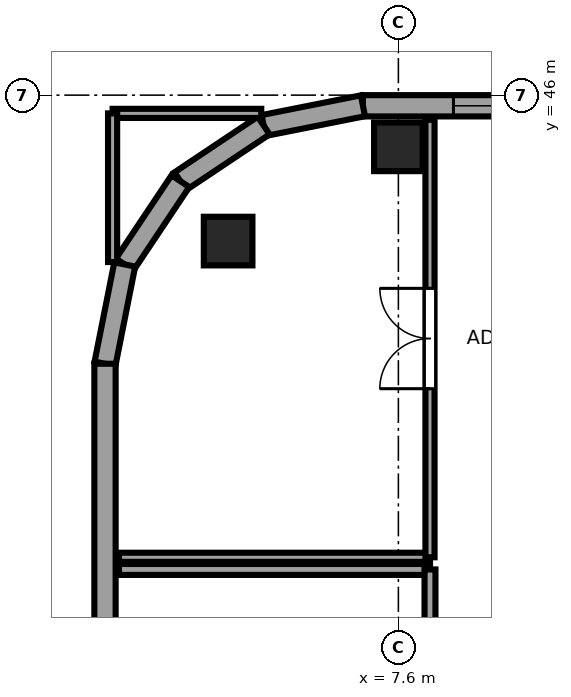
"""IFC4 building model, lengths in metres.
Left out: names, types, materials, properties, quantities, classifications, styles, units other than length and angle.
Written with IfcOpenShell. Run it as: python <this file> out.ifc"""

import sys

from ifc_helpers import new_model, si_unit, direction, frame, frame_2d, origin, origin_2d, place, context, subcontext, project, spatial, rectangle, extrude, source, transform, mapped, element, fill, save


model = new_model("IFC4")
c1 = context("Model", 3, precision=1e-05, world=origin(), true_north=direction((0.0, 1.0)))
c2 = subcontext(c1, "Body", "Model", "MODEL_VIEW")
j1 = project(units=[si_unit("LENGTHUNIT", "METRE"), si_unit("PLANEANGLEUNIT", "RADIAN")], contexts=[c1])
p1 = place(None, origin())
s1 = spatial("IfcSite", under=j1, at=p1, CompositionType="ELEMENT")
p2 = place(p1, origin())
s2 = spatial("IfcBuilding", under=s1, at=p2, CompositionType="ELEMENT")
p3 = place(p2, frame((0.0, 0.0, 201.75)))
s3 = spatial("IfcBuildingStorey", under=s2, at=p3, CompositionType="ELEMENT", Elevation=201.75)
m1 = source(origin(), c2, "Body", "SweptSolid", [
    extrude(rectangle(XDim=0.8, YDim=0.8, at=origin_2d()), origin(), (0.0, 0.0, 1.0), 3.55),
])
for number, where, z_axis, x_axis in (
    (1, (4.8, 43.6, 0.0), (0.0, 0.0, 1.0), (1.0, 0.0, 0.0)),
    (2, (7.6, 45.15, 0.0), (0.0, 0.0, 1.0), (1.0, 0.0, 0.0)),
):
    element("IfcColumn", number, at=place(p3, frame(where, z_axis=z_axis, x_axis=x_axis)), inside=s3, PredefinedType="COLUMN", context=c2, shape_type="MappedRepresentation", body=[
        mapped(m1, transform((0.0, 0.0, 0.0), x_axis=(1.0, 0.0, 0.0), y_axis=(0.0, 1.0, 0.0), z_axis=(0.0, 0.0, 1.0), scale=1.0)),
    ])
p4 = place(p3, frame((49.983, 45.825, 0.0), z_axis=(0.0, 0.0, 1.0), x_axis=(-1.0, 0.0, 0.0)))
e3 = element("IfcWall", 3, at=p4, inside=s3, PredefinedType="SOLIDWALL", context=c2, shape_type="SweptSolid", body=[
    extrude(rectangle(XDim=42.966, YDim=0.35, at=frame_2d((21.483, 0.0))), origin(), (0.0, 0.0, 1.0), 3.29),
])
p5 = place(p4, frame((1.488, 0.0, 0.68)))
e4 = element("IfcOpeningElement", 4, at=p5, cuts=e3, PredefinedType="OPENING", context=c2, shape_type="SweptSolid", body=[
    extrude(rectangle(XDim=2.4, YDim=1.9, at=frame_2d((1.2, 0.95))), frame((0.0, 0.185, 0.0), z_axis=(0.0, -1.0, 0.0), x_axis=(1.0, 0.0, 0.0)), (0.0, 0.0, 1.0), 0.37),
])
p6 = place(p4, frame((9.841, 0.0, 0.68)))
e5 = element("IfcOpeningElement", 5, at=p6, cuts=e3, PredefinedType="OPENING", context=c2, shape_type="SweptSolid", body=[
    extrude(rectangle(XDim=2.4, YDim=1.9, at=frame_2d((1.2, 0.95))), frame((0.0, 0.185, 0.0), z_axis=(0.0, -1.0, 0.0), x_axis=(1.0, 0.0, 0.0)), (0.0, 0.0, 1.0), 0.37),
])
p7 = place(p4, frame((14.018, 0.0, 0.68)))
e6 = element("IfcOpeningElement", 6, at=p7, cuts=e3, PredefinedType="OPENING", context=c2, shape_type="SweptSolid", body=[
    extrude(rectangle(XDim=2.4, YDim=1.9, at=frame_2d((1.2, 0.95))), frame((0.0, 0.185, 0.0), z_axis=(0.0, -1.0, 0.0), x_axis=(1.0, 0.0, 0.0)), (0.0, 0.0, 1.0), 0.37),
])
p8 = place(p4, frame((18.195, 0.0, 0.68)))
e7 = element("IfcOpeningElement", 7, at=p8, cuts=e3, PredefinedType="OPENING", context=c2, shape_type="SweptSolid", body=[
    extrude(rectangle(XDim=2.4, YDim=1.9, at=frame_2d((1.2, 0.95))), frame((0.0, 0.185, 0.0), z_axis=(0.0, -1.0, 0.0), x_axis=(1.0, 0.0, 0.0)), (0.0, 0.0, 1.0), 0.37),
])
p9 = place(p4, frame((22.371, 0.0, 0.68)))
e8 = element("IfcOpeningElement", 8, at=p9, cuts=e3, PredefinedType="OPENING", context=c2, shape_type="SweptSolid", body=[
    extrude(rectangle(XDim=2.4, YDim=1.9, at=frame_2d((1.2, 0.95))), frame((0.0, 0.185, 0.0), z_axis=(0.0, -1.0, 0.0), x_axis=(1.0, 0.0, 0.0)), (0.0, 0.0, 1.0), 0.37),
])
p10 = place(p4, frame((26.548, 0.0, 0.68)))
e9 = element("IfcOpeningElement", 9, at=p10, cuts=e3, PredefinedType="OPENING", context=c2, shape_type="SweptSolid", body=[
    extrude(rectangle(XDim=2.4, YDim=1.9, at=frame_2d((1.2, 0.95))), frame((0.0, 0.185, 0.0), z_axis=(0.0, -1.0, 0.0), x_axis=(1.0, 0.0, 0.0)), (0.0, 0.0, 1.0), 0.37),
])
p11 = place(p4, frame((30.724, 0.0, 0.68)))
e10 = element("IfcOpeningElement", 10, at=p11, cuts=e3, PredefinedType="OPENING", context=c2, shape_type="SweptSolid", body=[
    extrude(rectangle(XDim=2.4, YDim=1.9, at=frame_2d((1.2, 0.95))), frame((0.0, 0.185, 0.0), z_axis=(0.0, -1.0, 0.0), x_axis=(1.0, 0.0, 0.0)), (0.0, 0.0, 1.0), 0.37),
])
p12 = place(p4, frame((34.901, 0.0, 0.68)))
e11 = element("IfcOpeningElement", 11, at=p12, cuts=e3, PredefinedType="OPENING", context=c2, shape_type="SweptSolid", body=[
    extrude(rectangle(XDim=2.4, YDim=1.9, at=frame_2d((1.2, 0.95))), frame((0.0, 0.185, 0.0), z_axis=(0.0, -1.0, 0.0), x_axis=(1.0, 0.0, 0.0)), (0.0, 0.0, 1.0), 0.37),
])
p13 = place(p4, frame((39.077, 0.0, 0.68)))
e12 = element("IfcOpeningElement", 12, at=p13, cuts=e3, PredefinedType="OPENING", context=c2, shape_type="SweptSolid", body=[
    extrude(rectangle(XDim=2.4, YDim=1.9, at=frame_2d((1.2, 0.95))), frame((0.0, 0.185, 0.0), z_axis=(0.0, -1.0, 0.0), x_axis=(1.0, 0.0, 0.0)), (0.0, 0.0, 1.0), 0.37),
])
p14 = place(p3, frame((7.017, 45.825, 0.0), z_axis=(0.0, 0.0, 1.0), x_axis=(-0.980788844421, -0.195072403631, 0.0)))
e13 = element("IfcWall", 13, at=p14, inside=s3, PredefinedType="SOLIDWALL", context=c2, shape_type="SweptSolid", body=[
    extrude(rectangle(XDim=1.665, YDim=0.35, at=frame_2d((0.832, 0.0))), origin(), (0.0, 0.0, 1.0), 3.29),
])
for number, where, z_axis, x_axis in (
    (14, (5.385, 45.5, 0.0), (0.0, 0.0, 1.0), (-0.832, -0.556, 0.0)),
    (15, (4.015, 44.585, 0.0), (0.0, 0.0, 1.0), (-0.556, -0.831, 0.0)),
):
    element("IfcWall", number, at=place(p3, frame(where, z_axis=z_axis, x_axis=x_axis)), inside=s3, PredefinedType="SOLIDWALL", context=c2, shape_type="SweptSolid", body=[
        extrude(rectangle(XDim=1.647, YDim=0.35, at=frame_2d((0.824, 0.0))), origin(), (0.0, 0.0, 1.0), 2.752),
    ])
p15 = place(p3, frame((3.1, 43.216, 0.0), z_axis=(0.0, 0.0, 1.0), x_axis=(-0.195044345786, -0.980794424524, 0.0)))
e16 = element("IfcWall", 16, at=p15, inside=s3, PredefinedType="SOLIDWALL", context=c2, shape_type="SweptSolid", body=[
    extrude(rectangle(XDim=1.665, YDim=0.35, at=frame_2d((0.833, 0.0))), origin(), (0.0, 0.0, 1.0), 3.29),
])
p16 = place(p3, frame((2.775, 41.583, 0.0), z_axis=(0.0, 0.0, 1.0), x_axis=(0.0, -1.0, 0.0)))
e17 = element("IfcWall", 17, at=p16, inside=s3, PredefinedType="SOLIDWALL", context=c2, shape_type="SweptSolid", body=[
    extrude(rectangle(XDim=34.566, YDim=0.35, at=frame_2d((17.283, 0.0))), origin(), (0.0, 0.0, 1.0), 3.29),
])
p17 = place(p16, frame((10.877, 0.0, 0.68)))
e18 = element("IfcOpeningElement", 18, at=p17, cuts=e17, PredefinedType="OPENING", context=c2, shape_type="SweptSolid", body=[
    extrude(rectangle(XDim=2.4, YDim=1.9, at=frame_2d((1.2, 0.95))), frame((0.0, 0.185, 0.0), z_axis=(0.0, -1.0, 0.0), x_axis=(1.0, 0.0, 0.0)), (0.0, 0.0, 1.0), 0.37),
])
p18 = place(p16, frame((13.997, 0.0, 0.68)))
e19 = element("IfcOpeningElement", 19, at=p18, cuts=e17, PredefinedType="OPENING", context=c2, shape_type="SweptSolid", body=[
    extrude(rectangle(XDim=2.4, YDim=1.9, at=frame_2d((1.2, 0.95))), frame((0.0, 0.185, 0.0), z_axis=(0.0, -1.0, 0.0), x_axis=(1.0, 0.0, 0.0)), (0.0, 0.0, 1.0), 0.37),
])
p19 = place(p16, frame((22.339, 0.0, 0.68)))
e20 = element("IfcOpeningElement", 20, at=p19, cuts=e17, PredefinedType="OPENING", context=c2, shape_type="SweptSolid", body=[
    extrude(rectangle(XDim=2.4, YDim=1.9, at=frame_2d((1.2, 0.95))), frame((0.0, 0.185, 0.0), z_axis=(0.0, -1.0, 0.0), x_axis=(1.0, 0.0, 0.0)), (0.0, 0.0, 1.0), 0.37),
])
p20 = place(p16, frame((26.51, 0.0, 0.68)))
e21 = element("IfcOpeningElement", 21, at=p20, cuts=e17, PredefinedType="OPENING", context=c2, shape_type="SweptSolid", body=[
    extrude(rectangle(XDim=2.4, YDim=1.9, at=frame_2d((1.2, 0.95))), frame((0.0, 0.185, 0.0), z_axis=(0.0, -1.0, 0.0), x_axis=(1.0, 0.0, 0.0)), (0.0, 0.0, 1.0), 0.37),
])
p21 = place(p16, frame((30.13, 0.0, 0.68)))
e22 = element("IfcOpeningElement", 22, at=p21, cuts=e17, PredefinedType="OPENING", context=c2, shape_type="SweptSolid", body=[
    extrude(rectangle(XDim=2.4, YDim=1.9, at=frame_2d((1.2, 0.95))), frame((0.0, 0.185, 0.0), z_axis=(0.0, -1.0, 0.0), x_axis=(1.0, 0.0, 0.0)), (0.0, 0.0, 1.0), 0.37),
])
p22 = place(p16, frame((6.033, 0.0, 0.62)))
e23 = element("IfcOpeningElement", 23, at=p22, cuts=e17, PredefinedType="OPENING", context=c2, shape_type="SweptSolid", body=[
    extrude(rectangle(XDim=1.5, YDim=1.55, at=frame_2d((0.75, 0.775))), frame((0.0, 0.185, 0.0), z_axis=(0.0, -1.0, 0.0), x_axis=(1.0, 0.0, 0.0)), (0.0, 0.0, 1.0), 0.37),
])
p23 = place(p3, frame((3.005, 38.2, 0.0), z_axis=(0.0, 0.0, 1.0), x_axis=(1.0, 0.0, 0.0)))
e24 = element("IfcWall", 24, at=p23, inside=s3, PredefinedType="PARTITIONING", context=c2, shape_type="SweptSolid", body=[
    extrude(rectangle(XDim=5.115, YDim=0.18, at=frame_2d((2.558, 0.0))), origin(), (0.0, 0.0, 1.0), 3.29),
])
p24 = place(p3, frame((8.12, 31.4, 0.0), z_axis=(0.0, 0.0, 1.0), x_axis=(0.0, 1.0, 0.0)))
e25 = element("IfcWall", 25, at=p24, inside=s3, PredefinedType="PARTITIONING", context=c2, shape_type="SweptSolid", body=[
    extrude(rectangle(XDim=6.8, YDim=0.18, at=frame_2d((3.4, 0.0))), origin(), (0.0, 0.0, 1.0), 3.29),
])
p25 = place(p24, frame((3.175, 0.0, 0.0)))
e26 = element("IfcOpeningElement", 26, at=p25, cuts=e25, PredefinedType="OPENING", context=c2, shape_type="SweptSolid", body=[
    extrude(rectangle(XDim=1.65, YDim=2.15, at=frame_2d((0.825, 1.075))), frame((0.0, 0.1, 0.0), z_axis=(0.0, -1.0, 0.0), x_axis=(1.0, 0.0, 0.0)), (0.0, 0.0, 1.0), 0.2),
])
p26 = place(p3, frame((3.005, 38.4, 0.0), z_axis=(0.0, 0.0, 1.0), x_axis=(1.0, 0.0, 0.0)))
e27 = element("IfcWall", 27, at=p26, inside=s3, PredefinedType="PARTITIONING", context=c2, shape_type="SweptSolid", body=[
    extrude(rectangle(XDim=5.115, YDim=0.15, at=frame_2d((2.558, 0.0))), origin(), (0.0, 0.0, 1.0), 3.29),
])
for number, where, z_axis, x_axis in (
    (28, (2.9, 45.7, 0.0), (0.0, 0.0, 1.0), (1.0, 0.0, 0.0)),
    (29, (2.9, 43.255, 0.0), (0.0, 0.0, 1.0), (0.0, 1.0, 0.0)),
):
    element("IfcWall", number, at=place(p3, frame(where, z_axis=z_axis, x_axis=x_axis)), inside=s3, PredefinedType="PARTITIONING", context=c2, shape_type="SweptSolid", body=[
        extrude(rectangle(XDim=2.445, YDim=0.15, at=frame_2d((1.223, 0.0))), origin(), (0.0, 0.0, 1.0), 3.29),
    ])
p27 = place(p3, frame((8.12, 38.4, 0.0), z_axis=(0.0, 0.0, 1.0), x_axis=(0.0, 1.0, 0.0)))
e30 = element("IfcWall", 30, at=p27, inside=s3, PredefinedType="PARTITIONING", context=c2, shape_type="SweptSolid", body=[
    extrude(rectangle(XDim=7.195, YDim=0.15, at=frame_2d((3.598, 0.0))), origin(), (0.0, 0.0, 1.0), 3.29),
])
p28 = place(p27, frame((2.772, 0.0, 0.0)))
e31 = element("IfcOpeningElement", 31, at=p28, cuts=e30, PredefinedType="OPENING", context=c2, shape_type="SweptSolid", body=[
    extrude(rectangle(XDim=1.65, YDim=2.15, at=frame_2d((0.825, 1.075))), frame((0.0, 0.085, 0.0), z_axis=(0.0, -1.0, 0.0), x_axis=(1.0, 0.0, 0.0)), (0.0, 0.0, 1.0), 0.17),
])
m2 = source(origin(), c2, "Body", "SweptSolid", [
    extrude(rectangle(XDim=2.4, YDim=1.9, at=frame_2d((1.2, 0.95))), frame((0.0, 0.09, 0.0), z_axis=(0.0, -1.0, 0.0), x_axis=(1.0, 0.0, 0.0)), (0.0, 0.0, 1.0), 0.06),
])
p29 = place(p13, origin())
e32 = element("IfcWindow", 32, at=p29, inside=s3, PartitioningType="TRIPLE_PANEL_HORIZONTAL", PredefinedType="WINDOW", context=c2, shape_type="MappedRepresentation", body=[
    mapped(m2, transform((0.0, 0.0, 0.0), x_axis=(1.0, 0.0, 0.0), y_axis=(0.0, 1.0, 0.0), z_axis=(0.0, 0.0, 1.0), scale=1.0)),
])
fill(e12, e32)
m3 = source(origin(), c2, "Body", "SweptSolid", [
    extrude(rectangle(XDim=1.65, YDim=2.15, at=frame_2d((0.825, 1.075))), frame((0.0, 0.025, 0.0), z_axis=(0.0, -1.0, 0.0), x_axis=(1.0, 0.0, 0.0)), (0.0, 0.0, 1.0), 0.05),
])
p30 = place(p28, origin())
e33 = element("IfcDoor", 33, at=p30, inside=s3, OperationType="DOUBLE_DOOR_SINGLE_SWING", PredefinedType="DOOR", context=c2, shape_type="MappedRepresentation", body=[
    mapped(m3, transform((0.0, 0.0, 0.0), x_axis=(1.0, 0.0, 0.0), y_axis=(0.0, 1.0, 0.0), z_axis=(0.0, 0.0, 1.0), scale=1.0)),
])
fill(e31, e33)
save(model, sys.argv[1])
